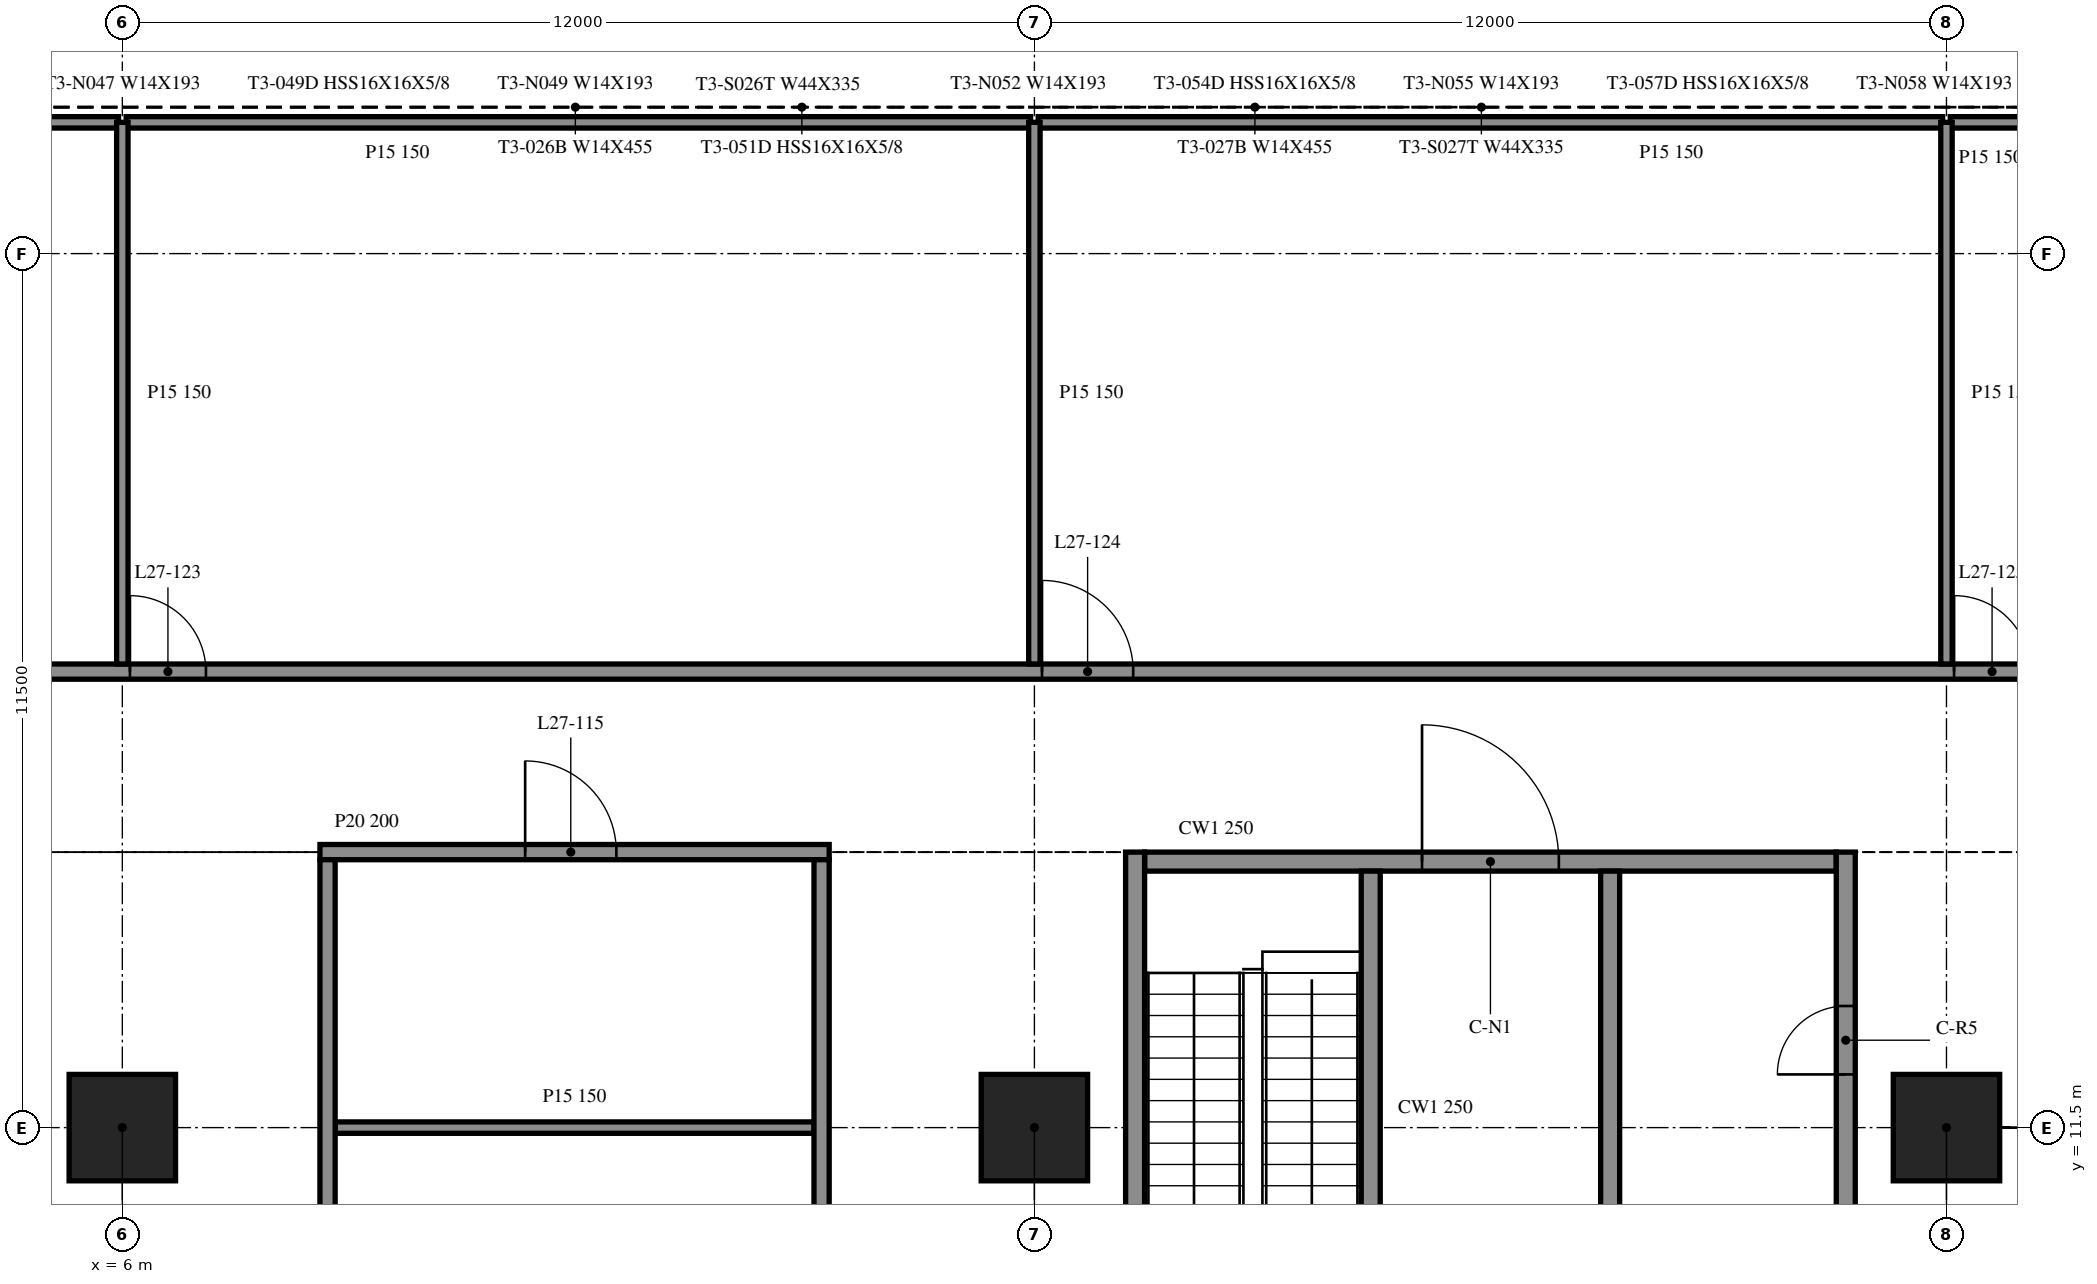
"""IFC4 building model, lengths in metres.
Left out: names, types, materials, properties, quantities, classifications, styles, units other than length and angle.
Written with IfcOpenShell. Run it as: python <this file> out.ifc"""

import sys

from ifc_helpers import new_model, si_unit, direction, frame, frame_2d, origin, origin_2d, place, context, subcontext, project, spatial, rectangle, extrude, element, fill, save


model = new_model("IFC4")
c1 = context("Model", 3, precision=1e-05, world=origin(), true_north=direction((0.0, 1.0)))
c2 = subcontext(c1, "Body", "Model", "MODEL_VIEW")
j1 = project(units=[si_unit("LENGTHUNIT", "METRE"), si_unit("PLANEANGLEUNIT", "RADIAN")], contexts=[c1])
p1 = place(None, origin())
s1 = spatial("IfcSite", under=j1, at=p1, CompositionType="ELEMENT")
p2 = place(p1, origin())
s2 = spatial("IfcBuilding", under=s1, at=p2, CompositionType="ELEMENT")
p3 = place(p2, frame((0.0, 0.0, 117.6)))
s3 = spatial("IfcBuildingStorey", under=s2, at=p3, CompositionType="ELEMENT", Elevation=117.6)
for number, where, z_axis, x_axis in (
    (1, (6.0, 11.5, -0.55), (0.0, 0.0, 1.0), (1.0, 0.0, 0.0)),
    (2, (18.0, 11.5, -0.55), (0.0, 0.0, 1.0), (1.0, 0.0, 0.0)),
    (3, (30.0, 11.5, -0.55), (0.0, 0.0, 1.0), (1.0, 0.0, 0.0)),
):
    element("IfcColumn", number, at=place(p3, frame(where, z_axis=z_axis, x_axis=x_axis)), inside=s3, PredefinedType="COLUMN", context=c2, shape_type="SweptSolid", body=[
        extrude(rectangle(XDim=1.4, YDim=1.4, at=origin_2d()), origin(), (0.0, 0.0, 1.0), 4.61),
    ])
p4 = place(p3, frame((19.325, 15.125, 0.0), z_axis=(0.0, 0.0, 1.0), x_axis=(0.0, -1.0, 0.0)))
e4 = element("IfcWall", 4, at=p4, inside=s3, PredefinedType="SOLIDWALL", context=c2, shape_type="SweptSolid", body=[
    extrude(rectangle(XDim=24.25, YDim=0.25, at=frame_2d((12.125, 0.0))), origin(), (0.0, 0.0, 1.0), 4.06),
])
p5 = place(p3, frame((28.675, -9.125, 0.0), z_axis=(0.0, 0.0, 1.0), x_axis=(0.0, 1.0, 0.0)))
e5 = element("IfcWall", 5, at=p5, inside=s3, PredefinedType="SOLIDWALL", context=c2, shape_type="SweptSolid", body=[
    extrude(rectangle(XDim=24.25, YDim=0.25, at=frame_2d((12.125, 0.0))), origin(), (0.0, 0.0, 1.0), 4.06),
])
p6 = place(p5, frame((14.425, 0.0, 0.0)))
e6 = element("IfcOpeningElement", 6, at=p6, cuts=e5, PredefinedType="OPENING", context=c2, shape_type="SweptSolid", body=[
    extrude(rectangle(XDim=0.9, YDim=2.1, at=frame_2d((0.45, 1.05))), frame((0.0, 0.135, 0.0), z_axis=(0.0, -1.0, 0.0), x_axis=(1.0, 0.0, 0.0)), (0.0, 0.0, 1.0), 0.27),
])
p7 = place(p5, frame((21.325, 0.0, 0.0)))
e7 = element("IfcOpeningElement", 7, at=p7, cuts=e5, PredefinedType="OPENING", context=c2, shape_type="SweptSolid", body=[
    extrude(rectangle(XDim=0.9, YDim=2.1, at=frame_2d((0.45, 1.05))), frame((0.0, 0.135, 0.0), z_axis=(0.0, -1.0, 0.0), x_axis=(1.0, 0.0, 0.0)), (0.0, 0.0, 1.0), 0.27),
])
p8 = place(p3, frame((19.45, 15.0, 0.0), z_axis=(0.0, 0.0, 1.0), x_axis=(1.0, 0.0, 0.0)))
e8 = element("IfcWall", 8, at=p8, inside=s3, PredefinedType="SOLIDWALL", context=c2, shape_type="SweptSolid", body=[
    extrude(rectangle(XDim=9.1, YDim=0.25, at=frame_2d((4.55, 0.0))), origin(), (0.0, 0.0, 1.0), 4.06),
])
p9 = place(p8, frame((3.65, 0.0, 0.0)))
e9 = element("IfcOpeningElement", 9, at=p9, cuts=e8, PredefinedType="OPENING", context=c2, shape_type="SweptSolid", body=[
    extrude(rectangle(XDim=1.8, YDim=2.1, at=frame_2d((0.9, 1.05))), frame((0.0, 0.135, 0.0), z_axis=(0.0, -1.0, 0.0), x_axis=(1.0, 0.0, 0.0)), (0.0, 0.0, 1.0), 0.27),
])
p10 = place(p3, frame((22.425, 14.875, 0.0), z_axis=(0.0, 0.0, 1.0), x_axis=(0.0, -1.0, 0.0)))
e10 = element("IfcWall", 10, at=p10, inside=s3, PredefinedType="SOLIDWALL", context=c2, shape_type="SweptSolid", body=[
    extrude(rectangle(XDim=6.25, YDim=0.25, at=frame_2d((3.125, 0.0))), origin(), (0.0, 0.0, 1.0), 4.06),
])
p11 = place(p10, frame((4.85, 0.0, 0.0)))
e11 = element("IfcOpeningElement", 11, at=p11, cuts=e10, PredefinedType="OPENING", context=c2, shape_type="SweptSolid", body=[
    extrude(rectangle(XDim=1.0, YDim=2.1, at=frame_2d((0.5, 1.05))), frame((0.0, 0.135, 0.0), z_axis=(0.0, -1.0, 0.0), x_axis=(1.0, 0.0, 0.0)), (0.0, 0.0, 1.0), 0.27),
])
p12 = place(p3, frame((25.575, 14.875, 0.0), z_axis=(0.0, 0.0, 1.0), x_axis=(0.0, -1.0, 0.0)))
e12 = element("IfcWall", 12, at=p12, inside=s3, PredefinedType="SOLIDWALL", context=c2, shape_type="SweptSolid", body=[
    extrude(rectangle(XDim=17.5, YDim=0.25, at=frame_2d((8.75, 0.0))), origin(), (0.0, 0.0, 1.0), 4.06),
])
p13 = place(p12, frame((15.45, 0.0, 0.0)))
e13 = element("IfcOpeningElement", 13, at=p13, cuts=e12, PredefinedType="OPENING", context=c2, shape_type="SweptSolid", body=[
    extrude(rectangle(XDim=1.1, YDim=2.1, at=frame_2d((0.55, 1.05))), frame((0.0, 0.135, 0.0), z_axis=(0.0, -1.0, 0.0), x_axis=(1.0, 0.0, 0.0)), (0.0, 0.0, 1.0), 0.27),
])
p14 = place(p12, frame((12.8, 0.0, 0.0)))
e14 = element("IfcOpeningElement", 14, at=p14, cuts=e12, PredefinedType="OPENING", context=c2, shape_type="SweptSolid", body=[
    extrude(rectangle(XDim=0.9, YDim=2.1, at=frame_2d((0.45, 1.05))), frame((0.0, 0.135, 0.0), z_axis=(0.0, -1.0, 0.0), x_axis=(1.0, 0.0, 0.0)), (0.0, 0.0, 1.0), 0.27),
])
p15 = place(p3, frame((8.8, 11.5, 0.0), z_axis=(0.0, 0.0, 1.0), x_axis=(1.0, 0.0, 0.0)))
e15 = element("IfcWall", 15, at=p15, inside=s3, PredefinedType="PARTITIONING", context=c2, shape_type="SweptSolid", body=[
    extrude(rectangle(XDim=6.3, YDim=0.15, at=frame_2d((3.15, 0.0))), origin(), (0.0, 0.0, 1.0), 4.06),
])
p16 = place(p3, frame((8.6, 15.125, 0.0), z_axis=(0.0, 0.0, 1.0), x_axis=(1.0, 0.0, 0.0)))
e16 = element("IfcWall", 16, at=p16, inside=s3, PredefinedType="PARTITIONING", context=c2, shape_type="SweptSolid", body=[
    extrude(rectangle(XDim=6.7, YDim=0.2, at=frame_2d((3.35, 0.0))), origin(), (0.0, 0.0, 1.0), 4.06),
])
p17 = place(p16, frame((2.7, 0.0, 0.0)))
e17 = element("IfcOpeningElement", 17, at=p17, cuts=e16, PredefinedType="OPENING", context=c2, shape_type="SweptSolid", body=[
    extrude(rectangle(XDim=1.2, YDim=2.1, at=frame_2d((0.6, 1.05))), frame((0.0, 0.11, 0.0), z_axis=(0.0, -1.0, 0.0), x_axis=(1.0, 0.0, 0.0)), (0.0, 0.0, 1.0), 0.22),
])
p18 = place(p3, frame((-48.0, 17.5, 0.0), z_axis=(0.0, 0.0, 1.0), x_axis=(1.0, 0.0, 0.0)))
e18 = element("IfcWall", 18, at=p18, inside=s3, PredefinedType="PARTITIONING", context=c2, shape_type="SweptSolid", body=[
    extrude(rectangle(XDim=95.8, YDim=0.2, at=frame_2d((47.9, 0.0))), origin(), (0.0, 0.0, 1.0), 4.06),
])
p19 = place(p18, frame((4.3, 0.0, 0.0)))
e19 = element("IfcOpeningElement", 19, at=p19, cuts=e18, PredefinedType="OPENING", context=c2, shape_type="SweptSolid", body=[
    extrude(rectangle(XDim=1.2, YDim=2.1, at=frame_2d((0.6, 1.05))), frame((0.0, 0.11, 0.0), z_axis=(0.0, -1.0, 0.0), x_axis=(1.0, 0.0, 0.0)), (0.0, 0.0, 1.0), 0.22),
])
p20 = place(p18, frame((16.5, 0.0, 0.0)))
e20 = element("IfcOpeningElement", 20, at=p20, cuts=e18, PredefinedType="OPENING", context=c2, shape_type="SweptSolid", body=[
    extrude(rectangle(XDim=1.0, YDim=2.1, at=frame_2d((0.5, 1.05))), frame((0.0, 0.11, 0.0), z_axis=(0.0, -1.0, 0.0), x_axis=(1.0, 0.0, 0.0)), (0.0, 0.0, 1.0), 0.22),
])
p21 = place(p18, frame((28.3, 0.0, 0.0)))
e21 = element("IfcOpeningElement", 21, at=p21, cuts=e18, PredefinedType="OPENING", context=c2, shape_type="SweptSolid", body=[
    extrude(rectangle(XDim=1.2, YDim=2.1, at=frame_2d((0.6, 1.05))), frame((0.0, 0.11, 0.0), z_axis=(0.0, -1.0, 0.0), x_axis=(1.0, 0.0, 0.0)), (0.0, 0.0, 1.0), 0.22),
])
p22 = place(p18, frame((40.3, 0.0, 0.0)))
e22 = element("IfcOpeningElement", 22, at=p22, cuts=e18, PredefinedType="OPENING", context=c2, shape_type="SweptSolid", body=[
    extrude(rectangle(XDim=1.2, YDim=2.1, at=frame_2d((0.6, 1.05))), frame((0.0, 0.11, 0.0), z_axis=(0.0, -1.0, 0.0), x_axis=(1.0, 0.0, 0.0)), (0.0, 0.0, 1.0), 0.22),
])
p23 = place(p18, frame((47.3, 0.0, 0.0)))
e23 = element("IfcOpeningElement", 23, at=p23, cuts=e18, PredefinedType="OPENING", context=c2, shape_type="SweptSolid", body=[
    extrude(rectangle(XDim=1.0, YDim=2.1, at=frame_2d((0.5, 1.05))), frame((0.0, 0.11, 0.0), z_axis=(0.0, -1.0, 0.0), x_axis=(1.0, 0.0, 0.0)), (0.0, 0.0, 1.0), 0.22),
])
p24 = place(p18, frame((54.1, 0.0, 0.0)))
e24 = element("IfcOpeningElement", 24, at=p24, cuts=e18, PredefinedType="OPENING", context=c2, shape_type="SweptSolid", body=[
    extrude(rectangle(XDim=1.0, YDim=2.1, at=frame_2d((0.5, 1.05))), frame((0.0, 0.11, 0.0), z_axis=(0.0, -1.0, 0.0), x_axis=(1.0, 0.0, 0.0)), (0.0, 0.0, 1.0), 0.22),
])
p25 = place(p18, frame((66.1, 0.0, 0.0)))
e25 = element("IfcOpeningElement", 25, at=p25, cuts=e18, PredefinedType="OPENING", context=c2, shape_type="SweptSolid", body=[
    extrude(rectangle(XDim=1.2, YDim=2.1, at=frame_2d((0.6, 1.05))), frame((0.0, 0.11, 0.0), z_axis=(0.0, -1.0, 0.0), x_axis=(1.0, 0.0, 0.0)), (0.0, 0.0, 1.0), 0.22),
])
p26 = place(p18, frame((78.1, 0.0, 0.0)))
e26 = element("IfcOpeningElement", 26, at=p26, cuts=e18, PredefinedType="OPENING", context=c2, shape_type="SweptSolid", body=[
    extrude(rectangle(XDim=1.0, YDim=2.1, at=frame_2d((0.5, 1.05))), frame((0.0, 0.11, 0.0), z_axis=(0.0, -1.0, 0.0), x_axis=(1.0, 0.0, 0.0)), (0.0, 0.0, 1.0), 0.22),
])
p27 = place(p18, frame((90.1, 0.0, 0.0)))
e27 = element("IfcOpeningElement", 27, at=p27, cuts=e18, PredefinedType="OPENING", context=c2, shape_type="SweptSolid", body=[
    extrude(rectangle(XDim=1.2, YDim=2.1, at=frame_2d((0.6, 1.05))), frame((0.0, 0.11, 0.0), z_axis=(0.0, -1.0, 0.0), x_axis=(1.0, 0.0, 0.0)), (0.0, 0.0, 1.0), 0.22),
])
for number, where, z_axis, x_axis in (
    (28, (-5.95, 24.727, 0.0), (0.0, 0.0, 1.0), (1.0, 0.0, 0.0)),
    (29, (6.05, 24.727, 0.0), (0.0, 0.0, 1.0), (1.0, 0.0, 0.0)),
    (30, (18.05, 24.727, 0.0), (0.0, 0.0, 1.0), (1.0, 0.0, 0.0)),
    (31, (30.05, 24.727, 0.0), (0.0, 0.0, 1.0), (1.0, 0.0, 0.0)),
):
    element("IfcWall", number, at=place(p3, frame(where, z_axis=z_axis, x_axis=x_axis)), inside=s3, PredefinedType="PARTITIONING", context=c2, shape_type="SweptSolid", body=[
        extrude(rectangle(XDim=11.9, YDim=0.15, at=frame_2d((5.95, 0.0))), origin(), (0.0, 0.0, 1.0), 4.06),
    ])
p28 = place(p3, frame((6.0, 17.6, 0.0), z_axis=(0.0, 0.0, 1.0), x_axis=(0.0, 1.0, 0.0)))
e32 = element("IfcWall", 32, at=p28, inside=s3, PredefinedType="PARTITIONING", context=c2, shape_type="SweptSolid", body=[
    extrude(rectangle(XDim=7.127, YDim=0.15, at=frame_2d((3.563, 0.0))), origin(), (0.0, 0.0, 1.0), 4.06),
])
for number, where, z_axis, x_axis in (
    (33, (8.7, -9.025, 0.0), (0.0, 0.0, 1.0), (0.0, 1.0, 0.0)),
    (34, (15.2, -9.025, 0.0), (0.0, 0.0, 1.0), (0.0, 1.0, 0.0)),
):
    element("IfcWall", number, at=place(p3, frame(where, z_axis=z_axis, x_axis=x_axis)), inside=s3, PredefinedType="PARTITIONING", context=c2, shape_type="SweptSolid", body=[
        extrude(rectangle(XDim=24.05, YDim=0.2, at=frame_2d((12.025, 0.0))), origin(), (0.0, 0.0, 1.0), 4.06),
    ])
for number, where, z_axis, x_axis in (
    (35, (18.0, 17.6, 0.0), (0.0, 0.0, 1.0), (0.0, 1.0, 0.0)),
    (36, (30.0, 17.6, 0.0), (0.0, 0.0, 1.0), (0.0, 1.0, 0.0)),
):
    element("IfcWall", number, at=place(p3, frame(where, z_axis=z_axis, x_axis=x_axis)), inside=s3, PredefinedType="PARTITIONING", context=c2, shape_type="SweptSolid", body=[
        extrude(rectangle(XDim=7.127, YDim=0.15, at=frame_2d((3.563, 0.0))), origin(), (0.0, 0.0, 1.0), 4.06),
    ])
p29 = place(p9, origin())
e37 = element("IfcDoor", 37, at=p29, inside=s3, OperationType="DOUBLE_DOOR_SINGLE_SWING", PredefinedType="DOOR", context=c2, shape_type="SweptSolid", body=[
    extrude(rectangle(XDim=1.8, YDim=2.1, at=frame_2d((0.9, 1.05))), frame((0.0, 0.025, 0.0), z_axis=(0.0, -1.0, 0.0), x_axis=(1.0, 0.0, 0.0)), (0.0, 0.0, 1.0), 0.05),
])
fill(e9, e37)
p30 = place(p7, origin())
e38 = element("IfcDoor", 38, at=p30, inside=s3, OperationType="SINGLE_SWING_LEFT", PredefinedType="DOOR", context=c2, shape_type="SweptSolid", body=[
    extrude(rectangle(XDim=0.9, YDim=2.1, at=frame_2d((0.45, 1.05))), frame((0.0, 0.025, 0.0), z_axis=(0.0, -1.0, 0.0), x_axis=(1.0, 0.0, 0.0)), (0.0, 0.0, 1.0), 0.05),
])
fill(e7, e38)
p31 = place(p17, origin())
e39 = element("IfcDoor", 39, at=p31, inside=s3, OperationType="SINGLE_SWING_RIGHT", PredefinedType="DOOR", context=c2, shape_type="SweptSolid", body=[
    extrude(rectangle(XDim=1.2, YDim=2.1, at=frame_2d((0.6, 1.05))), frame((0.0, 0.025, 0.0), z_axis=(0.0, -1.0, 0.0), x_axis=(1.0, 0.0, 0.0)), (0.0, 0.0, 1.0), 0.05),
])
fill(e17, e39)
p32 = place(p24, origin())
e40 = element("IfcDoor", 40, at=p32, inside=s3, OperationType="SINGLE_SWING_RIGHT", PredefinedType="DOOR", context=c2, shape_type="SweptSolid", body=[
    extrude(rectangle(XDim=1.0, YDim=2.1, at=frame_2d((0.5, 1.05))), frame((0.0, 0.025, 0.0), z_axis=(0.0, -1.0, 0.0), x_axis=(1.0, 0.0, 0.0)), (0.0, 0.0, 1.0), 0.05),
])
fill(e24, e40)
p33 = place(p25, origin())
e41 = element("IfcDoor", 41, at=p33, inside=s3, OperationType="SINGLE_SWING_RIGHT", PredefinedType="DOOR", context=c2, shape_type="SweptSolid", body=[
    extrude(rectangle(XDim=1.2, YDim=2.1, at=frame_2d((0.6, 1.05))), frame((0.0, 0.025, 0.0), z_axis=(0.0, -1.0, 0.0), x_axis=(1.0, 0.0, 0.0)), (0.0, 0.0, 1.0), 0.05),
])
fill(e25, e41)
p34 = place(p26, origin())
e42 = element("IfcDoor", 42, at=p34, inside=s3, OperationType="SINGLE_SWING_RIGHT", PredefinedType="DOOR", context=c2, shape_type="SweptSolid", body=[
    extrude(rectangle(XDim=1.0, YDim=2.1, at=frame_2d((0.5, 1.05))), frame((0.0, 0.025, 0.0), z_axis=(0.0, -1.0, 0.0), x_axis=(1.0, 0.0, 0.0)), (0.0, 0.0, 1.0), 0.05),
])
fill(e26, e42)
save(model, sys.argv[1])
